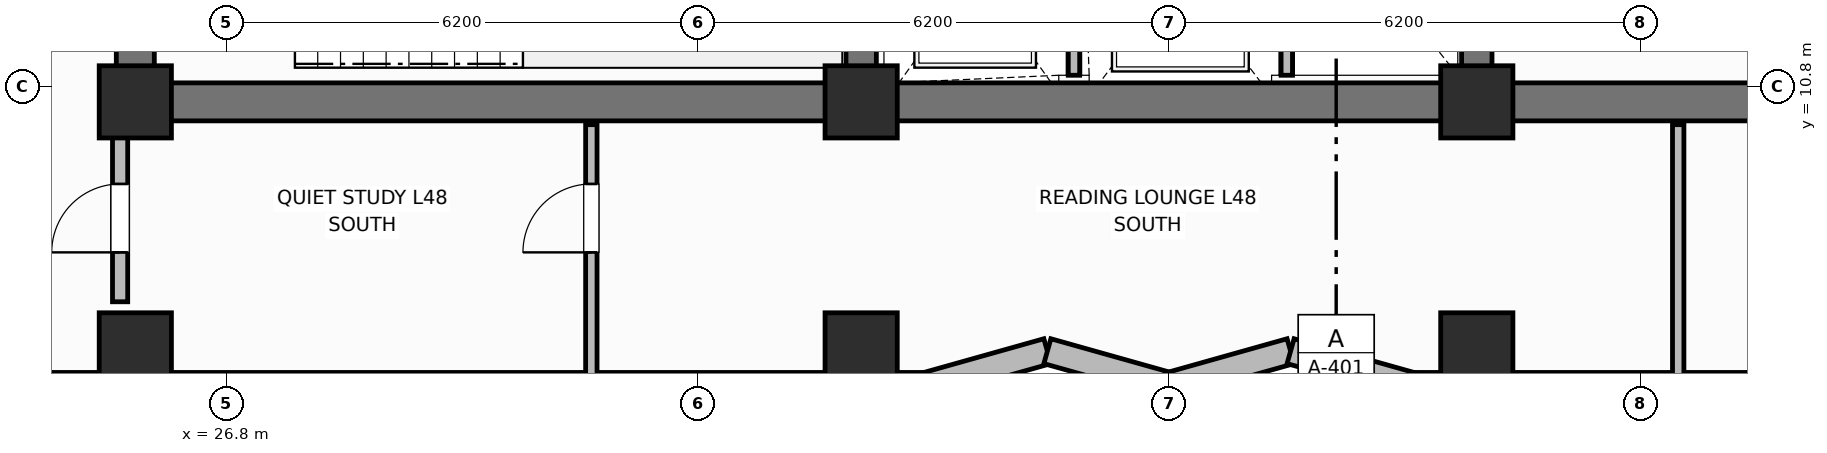
"""IFC4 building model, lengths in metres.
Left out: names, types, materials, properties, quantities, classifications, styles, units other than length and angle.
Written with IfcOpenShell. Run it as: python <this file> out.ifc"""

import sys

from ifc_helpers import new_model, si_unit, direction, frame, frame_2d, origin, origin_2d, place, context, subcontext, project, spatial, rectangle, extrude, element, fill, save


model = new_model("IFC4")
c1 = context("Model", 3, precision=1e-05, world=origin(), true_north=direction((0.0, 1.0)))
c2 = subcontext(c1, "Body", "Model", "MODEL_VIEW")
j1 = project(units=[si_unit("LENGTHUNIT", "METRE"), si_unit("PLANEANGLEUNIT", "RADIAN")], contexts=[c1])
p1 = place(None, origin())
s1 = spatial("IfcSite", under=j1, at=p1, CompositionType="ELEMENT")
p2 = place(p1, origin())
s2 = spatial("IfcBuilding", under=s1, at=p2, CompositionType="ELEMENT")
p3 = place(p2, frame((0.0, 0.0, 192.2)))
s3 = spatial("IfcBuildingStorey", under=s2, at=p3, CompositionType="ELEMENT", Elevation=192.2)
p4 = place(p3, frame((52.8, 10.6, 0.0), z_axis=(0.0, 0.0, 1.0), x_axis=(-1.0, 0.0, 0.0)))
e1 = element("IfcWall", 1, at=p4, inside=s3, PredefinedType="SHEAR", context=c2, shape_type="SweptSolid", body=[
    extrude(rectangle(XDim=27.2, YDim=0.5, at=frame_2d((13.6, 0.0))), origin(), (0.0, 0.0, 1.0), 3.7),
])
p5 = place(p3, frame((25.6, 10.85, 0.0), z_axis=(0.0, 0.0, 1.0), x_axis=(0.0, 1.0, 0.0)))
e2 = element("IfcWall", 2, at=p5, inside=s3, PredefinedType="SHEAR", context=c2, shape_type="SweptSolid", body=[
    extrude(rectangle(XDim=5.7, YDim=0.5, at=frame_2d((2.85, 0.0))), origin(), (0.0, 0.0, 1.0), 3.7),
])
for number, where, z_axis, x_axis in (
    (3, (35.15, 10.85, 0.0), (0.0, 0.0, 1.0), (0.0, 1.0, 0.0)),
    (4, (43.25, 10.85, 0.0), (0.0, 0.0, 1.0), (0.0, 1.0, 0.0)),
):
    element("IfcWall", number, at=place(p3, frame(where, z_axis=z_axis, x_axis=x_axis)), inside=s3, PredefinedType="SHEAR", context=c2, shape_type="SweptSolid", body=[
        extrude(rectangle(XDim=5.7, YDim=0.4, at=frame_2d((2.85, 0.0))), origin(), (0.0, 0.0, 1.0), 3.7),
    ])
for number, where, z_axis, x_axis in (
    (5, (25.6, 10.6, 0.0), (0.0, 0.0, 1.0), (1.0, 0.0, 0.0)),
    (6, (35.15, 10.6, 0.0), (0.0, 0.0, 1.0), (1.0, 0.0, 0.0)),
    (7, (43.25, 10.6, 0.0), (0.0, 0.0, 1.0), (1.0, 0.0, 0.0)),
    (8, (25.6, 7.35, 0.0), (0.0, 0.0, 1.0), (1.0, 0.0, 0.0)),
    (9, (35.15, 7.35, 0.0), (0.0, 0.0, 1.0), (1.0, 0.0, 0.0)),
    (10, (43.25, 7.35, 0.0), (0.0, 0.0, 1.0), (1.0, 0.0, 0.0)),
):
    element("IfcColumn", number, at=place(p3, frame(where, z_axis=z_axis, x_axis=x_axis)), inside=s3, PredefinedType="COLUMN", context=c2, shape_type="SweptSolid", body=[
        extrude(rectangle(XDim=0.95, YDim=0.95, at=origin_2d()), origin(), (0.0, 0.0, 1.0), 3.7),
    ])
p6 = place(p3, frame((20.2, 6.87, 0.0), z_axis=(0.0, 0.0, 1.0), x_axis=(1.0, 0.0, 0.0)))
e11 = element("IfcWall", 11, at=p6, inside=s3, PredefinedType="SOLIDWALL", context=c2, shape_type="SweptSolid", body=[
    extrude(rectangle(XDim=15.8, YDim=0.34, at=frame_2d((7.9, 0.0))), origin(), (0.0, 0.0, 1.0), 2.66),
])
p7 = place(p6, frame((1.55, 0.0, 0.89)))
e12 = element("IfcOpeningElement", 12, at=p7, cuts=e11, PredefinedType="OPENING", context=c2, shape_type="SweptSolid", body=[
    extrude(rectangle(XDim=1.1, YDim=1.65, at=frame_2d((0.55, 0.825))), frame((0.0, 0.18, 0.0), z_axis=(0.0, -1.0, 0.0), x_axis=(1.0, 0.0, 0.0)), (0.0, 0.0, 1.0), 0.36),
])
p8 = place(p6, frame((7.35, 0.0, 0.89)))
e13 = element("IfcOpeningElement", 13, at=p8, cuts=e11, PredefinedType="OPENING", context=c2, shape_type="SweptSolid", body=[
    extrude(rectangle(XDim=1.1, YDim=1.65, at=frame_2d((0.55, 0.825))), frame((0.0, 0.18, 0.0), z_axis=(0.0, -1.0, 0.0), x_axis=(1.0, 0.0, 0.0)), (0.0, 0.0, 1.0), 0.36),
])
p9 = place(p6, frame((9.9, 0.0, 0.89)))
e14 = element("IfcOpeningElement", 14, at=p9, cuts=e11, PredefinedType="OPENING", context=c2, shape_type="SweptSolid", body=[
    extrude(rectangle(XDim=1.1, YDim=1.65, at=frame_2d((0.55, 0.825))), frame((0.0, 0.18, 0.0), z_axis=(0.0, -1.0, 0.0), x_axis=(1.0, 0.0, 0.0)), (0.0, 0.0, 1.0), 0.36),
])
p10 = place(p6, frame((12.45, 0.0, 0.89)))
e15 = element("IfcOpeningElement", 15, at=p10, cuts=e11, PredefinedType="OPENING", context=c2, shape_type="SweptSolid", body=[
    extrude(rectangle(XDim=1.1, YDim=1.65, at=frame_2d((0.55, 0.825))), frame((0.0, 0.18, 0.0), z_axis=(0.0, -1.0, 0.0), x_axis=(1.0, 0.0, 0.0)), (0.0, 0.0, 1.0), 0.36),
])
p11 = place(p3, frame((36.0, 6.87, 0.0), z_axis=(0.0, 0.0, 1.0), x_axis=(0.962662902433, 0.270703040766, 0.0)))
e16 = element("IfcWall", 16, at=p11, inside=s3, PredefinedType="SOLIDWALL", context=c2, shape_type="SweptSolid", body=[
    extrude(rectangle(XDim=1.662, YDim=0.34, at=frame_2d((0.831, 0.0))), origin(), (0.0, 0.0, 1.0), 2.66),
])
p12 = place(p3, frame((37.6, 7.32, 0.0), z_axis=(0.0, 0.0, 1.0), x_axis=(0.962652136636, -0.270741322725, 0.0)))
e17 = element("IfcWall", 17, at=p12, inside=s3, PredefinedType="SOLIDWALL", context=c2, shape_type="SweptSolid", body=[
    extrude(rectangle(XDim=1.662, YDim=0.34, at=frame_2d((0.831, 0.0))), origin(), (0.0, 0.0, 1.0), 2.66),
])
p13 = place(p3, frame((39.2, 6.87, 0.0), z_axis=(0.0, 0.0, 1.0), x_axis=(0.962662902433, 0.270703040766, 0.0)))
e18 = element("IfcWall", 18, at=p13, inside=s3, PredefinedType="SOLIDWALL", context=c2, shape_type="SweptSolid", body=[
    extrude(rectangle(XDim=1.662, YDim=0.34, at=frame_2d((0.831, 0.0))), origin(), (0.0, 0.0, 1.0), 2.66),
])
p14 = place(p3, frame((40.8, 7.32, 0.0), z_axis=(0.0, 0.0, 1.0), x_axis=(0.962652136636, -0.270741322725, 0.0)))
e19 = element("IfcWall", 19, at=p14, inside=s3, PredefinedType="SOLIDWALL", context=c2, shape_type="SweptSolid", body=[
    extrude(rectangle(XDim=1.662, YDim=0.34, at=frame_2d((0.831, 0.0))), origin(), (0.0, 0.0, 1.0), 2.66),
])
p15 = place(p3, frame((42.4, 6.87, 0.0), z_axis=(0.0, 0.0, 1.0), x_axis=(1.0, 0.0, 0.0)))
e20 = element("IfcWall", 20, at=p15, inside=s3, PredefinedType="SOLIDWALL", context=c2, shape_type="SweptSolid", body=[
    extrude(rectangle(XDim=15.8, YDim=0.34, at=frame_2d((7.9, 0.0))), origin(), (0.0, 0.0, 1.0), 2.66),
])
p16 = place(p15, frame((4.45, 0.0, 0.89)))
e21 = element("IfcOpeningElement", 21, at=p16, cuts=e20, PredefinedType="OPENING", context=c2, shape_type="SweptSolid", body=[
    extrude(rectangle(XDim=1.1, YDim=1.65, at=frame_2d((0.55, 0.825))), frame((0.0, 0.18, 0.0), z_axis=(0.0, -1.0, 0.0), x_axis=(1.0, 0.0, 0.0)), (0.0, 0.0, 1.0), 0.36),
])
p17 = place(p15, frame((7.35, 0.0, 0.89)))
e22 = element("IfcOpeningElement", 22, at=p17, cuts=e20, PredefinedType="OPENING", context=c2, shape_type="SweptSolid", body=[
    extrude(rectangle(XDim=1.1, YDim=1.65, at=frame_2d((0.55, 0.825))), frame((0.0, 0.18, 0.0), z_axis=(0.0, -1.0, 0.0), x_axis=(1.0, 0.0, 0.0)), (0.0, 0.0, 1.0), 0.36),
])
p18 = place(p15, frame((13.85, 0.0, 0.89)))
e23 = element("IfcOpeningElement", 23, at=p18, cuts=e20, PredefinedType="OPENING", context=c2, shape_type="SweptSolid", body=[
    extrude(rectangle(XDim=1.1, YDim=1.65, at=frame_2d((0.55, 0.825))), frame((0.0, 0.18, 0.0), z_axis=(0.0, -1.0, 0.0), x_axis=(1.0, 0.0, 0.0)), (0.0, 0.0, 1.0), 0.36),
])
for number, where, z_axis, x_axis in (
    (24, (37.95, 10.95, 0.0), (0.0, 0.0, 1.0), (0.0, 1.0, 0.0)),
    (25, (40.75, 10.95, 0.0), (0.0, 0.0, 1.0), (0.0, 1.0, 0.0)),
):
    element("IfcWall", number, at=place(p3, frame(where, z_axis=z_axis, x_axis=x_axis)), inside=s3, PredefinedType="PARTITIONING", context=c2, shape_type="SweptSolid", body=[
        extrude(rectangle(XDim=2.75, YDim=0.15, at=frame_2d((1.375, 0.0))), origin(), (0.0, 0.0, 1.0), 2.49),
    ])
p19 = place(p3, frame((31.6, 6.87, 0.0), z_axis=(0.0, 0.0, 1.0), x_axis=(0.0, 1.0, 0.0)))
e26 = element("IfcWall", 26, at=p19, inside=s3, PredefinedType="PARTITIONING", context=c2, shape_type="SweptSolid", body=[
    extrude(rectangle(XDim=3.43, YDim=0.15, at=frame_2d((1.715, 0.0))), origin(), (0.0, 0.0, 1.0), 2.49),
])
p20 = place(p19, frame((1.75, 0.0, 0.0)))
e27 = element("IfcOpeningElement", 27, at=p20, cuts=e26, PredefinedType="OPENING", context=c2, shape_type="SweptSolid", body=[
    extrude(rectangle(XDim=0.9, YDim=2.1, at=frame_2d((0.45, 1.05))), frame((0.0, 0.085, 0.0), z_axis=(0.0, -1.0, 0.0), x_axis=(1.0, 0.0, 0.0)), (0.0, 0.0, 1.0), 0.17),
])
p21 = place(p3, frame((45.9, 6.87, 0.0), z_axis=(0.0, 0.0, 1.0), x_axis=(0.0, 1.0, 0.0)))
e28 = element("IfcWall", 28, at=p21, inside=s3, PredefinedType="PARTITIONING", context=c2, shape_type="SweptSolid", body=[
    extrude(rectangle(XDim=3.43, YDim=0.15, at=frame_2d((1.715, 0.0))), origin(), (0.0, 0.0, 1.0), 2.49),
])
p22 = place(p3, frame((25.4, 7.97, 0.0), z_axis=(0.0, 0.0, 1.0), x_axis=(0.0, 1.0, 0.0)))
e29 = element("IfcWall", 29, at=p22, inside=s3, PredefinedType="PARTITIONING", context=c2, shape_type="SweptSolid", body=[
    extrude(rectangle(XDim=2.33, YDim=0.2, at=frame_2d((1.165, 0.0))), origin(), (0.0, 0.0, 1.0), 2.49),
])
p23 = place(p22, frame((0.65, 0.0, 0.0)))
e30 = element("IfcOpeningElement", 30, at=p23, cuts=e29, PredefinedType="OPENING", context=c2, shape_type="SweptSolid", body=[
    extrude(rectangle(XDim=0.9, YDim=2.1, at=frame_2d((0.45, 1.05))), frame((0.0, 0.11, 0.0), z_axis=(0.0, -1.0, 0.0), x_axis=(1.0, 0.0, 0.0)), (0.0, 0.0, 1.0), 0.22),
])
p24 = place(p20, origin())
e31 = element("IfcDoor", 31, at=p24, inside=s3, OperationType="SINGLE_SWING_LEFT", PredefinedType="DOOR", context=c2, shape_type="SweptSolid", body=[
    extrude(rectangle(XDim=0.9, YDim=2.1, at=frame_2d((0.45, 1.05))), frame((0.0, 0.025, 0.0), z_axis=(0.0, -1.0, 0.0), x_axis=(1.0, 0.0, 0.0)), (0.0, 0.0, 1.0), 0.05),
])
fill(e27, e31)
p25 = place(p23, origin())
e32 = element("IfcDoor", 32, at=p25, inside=s3, OperationType="SINGLE_SWING_LEFT", PredefinedType="DOOR", context=c2, shape_type="SweptSolid", body=[
    extrude(rectangle(XDim=0.9, YDim=2.1, at=frame_2d((0.45, 1.05))), frame((0.0, 0.025, 0.0), z_axis=(0.0, -1.0, 0.0), x_axis=(1.0, 0.0, 0.0)), (0.0, 0.0, 1.0), 0.05),
])
fill(e30, e32)
save(model, sys.argv[1])
